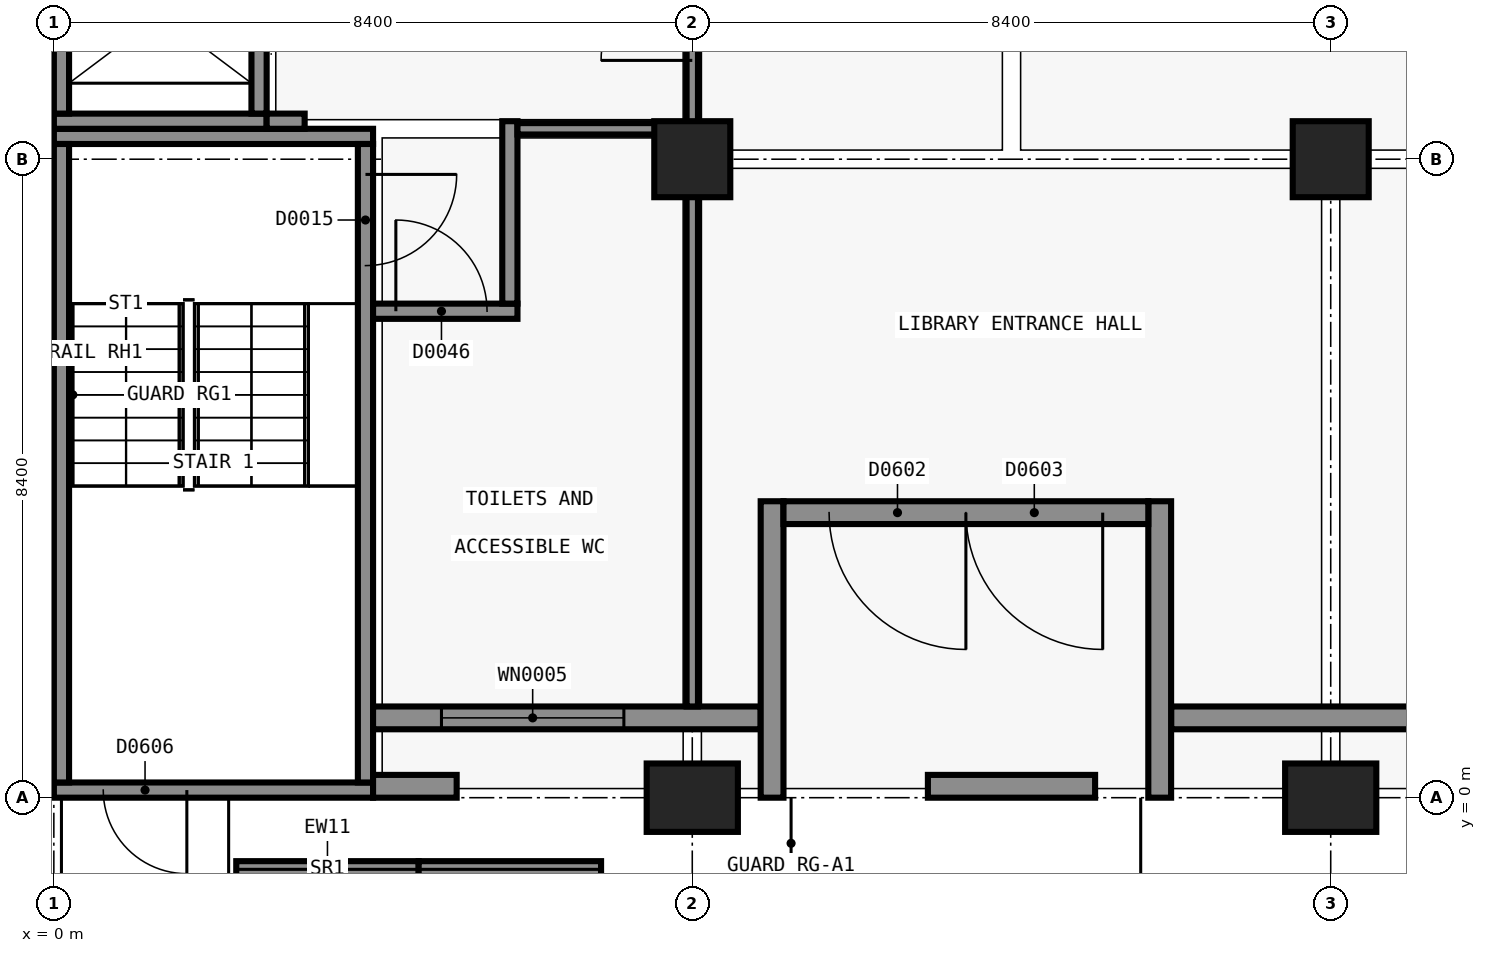
"""IFC4 building model, lengths in metres.
Left out: names, types, materials, properties, quantities, classifications, styles, units other than length and angle.
Written with IfcOpenShell. Run it as: python <this file> out.ifc"""

import sys

from ifc_helpers import new_model, si_unit, direction, frame, frame_2d, origin, origin_2d, place, context, subcontext, project, spatial, rectangle, extrude, element, fill, save


model = new_model("IFC4")
c1 = context("Model", 3, precision=1e-05, world=origin(), true_north=direction((0.0, 1.0)))
c2 = subcontext(c1, "Body", "Model", "MODEL_VIEW")
j1 = project(units=[si_unit("LENGTHUNIT", "METRE"), si_unit("PLANEANGLEUNIT", "RADIAN")], contexts=[c1])
p1 = place(None, origin())
s1 = spatial("IfcSite", under=j1, at=p1, CompositionType="ELEMENT")
p2 = place(p1, origin())
s2 = spatial("IfcBuilding", under=s1, at=p2, CompositionType="ELEMENT")
p3 = place(p2, origin())
s3 = spatial("IfcBuildingStorey", under=s2, at=p3, CompositionType="ELEMENT", Elevation=0.0)
p4 = place(p3, frame((4.2, 0.1, -0.3), z_axis=(0.0, 0.0, 1.0), x_axis=(-1.0, 0.0, 0.0)))
e1 = element("IfcWall", 1, at=p4, inside=s3, PredefinedType="SHEAR", context=c2, shape_type="SweptSolid", body=[
    extrude(rectangle(XDim=4.199, YDim=0.2, at=frame_2d((2.1, 0.0))), origin(), (0.0, 0.0, 1.0), 5.7),
])
p5 = place(p4, frame((2.45, 0.0, 0.0)))
e2 = element("IfcOpeningElement", 2, at=p5, cuts=e1, PredefinedType="OPENING", context=c2, shape_type="SweptSolid", body=[
    extrude(rectangle(XDim=1.1, YDim=2.2, at=frame_2d((0.55, 1.1))), frame((0.0, 0.11, 0.0), z_axis=(0.0, -1.0, 0.0), x_axis=(1.0, 0.0, 0.0)), (0.0, 0.0, 1.0), 0.22),
])
p6 = place(p3, frame((0.0, 8.7, -0.3), z_axis=(0.0, 0.0, 1.0), x_axis=(1.0, 0.0, 0.0)))
e3 = element("IfcWall", 3, at=p6, inside=s3, PredefinedType="SHEAR", context=c2, shape_type="SweptSolid", body=[
    extrude(rectangle(XDim=4.199, YDim=0.2, at=frame_2d((2.1, 0.0))), origin(), (0.0, 0.0, 1.0), 5.7),
])
p7 = place(p3, frame((0.1, 0.2, -0.3), z_axis=(0.0, 0.0, 1.0), x_axis=(0.0, 1.0, 0.0)))
e4 = element("IfcWall", 4, at=p7, inside=s3, PredefinedType="SHEAR", context=c2, shape_type="SweptSolid", body=[
    extrude(rectangle(XDim=8.4, YDim=0.2, at=frame_2d((4.2, 0.0))), origin(), (0.0, 0.0, 1.0), 5.7),
])
p8 = place(p3, frame((4.1, 8.6, -0.3), z_axis=(0.0, 0.0, 1.0), x_axis=(0.0, -1.0, 0.0)))
e5 = element("IfcWall", 5, at=p8, inside=s3, PredefinedType="SHEAR", context=c2, shape_type="SweptSolid", body=[
    extrude(rectangle(XDim=8.4, YDim=0.2, at=frame_2d((4.2, 0.0))), origin(), (0.0, 0.0, 1.0), 5.7),
])
p9 = place(p8, frame((0.4, 0.0, 0.3)))
e6 = element("IfcOpeningElement", 6, at=p9, cuts=e5, PredefinedType="OPENING", context=c2, shape_type="SweptSolid", body=[
    extrude(rectangle(XDim=1.2, YDim=2.1, at=frame_2d((0.6, 1.05))), frame((0.0, 0.11, 0.0), z_axis=(0.0, -1.0, 0.0), x_axis=(1.0, 0.0, 0.0)), (0.0, 0.0, 1.0), 0.22),
])
p10 = place(p3, frame((2.8, 8.9, -1.6), z_axis=(0.0, 0.0, 1.0), x_axis=(-1.0, 0.0, 0.0)))
e7 = element("IfcWall", 7, at=p10, inside=s3, PredefinedType="SHEAR", context=c2, shape_type="SweptSolid", body=[
    extrude(rectangle(XDim=2.8, YDim=0.2, at=frame_2d((1.4, 0.0))), origin(), (0.0, 0.0, 1.0), 7.0),
])
p11 = place(p3, frame((0.1, 9.0, -1.6), z_axis=(0.0, 0.0, 1.0), x_axis=(0.0, 1.0, 0.0)))
e8 = element("IfcWall", 8, at=p11, inside=s3, PredefinedType="SHEAR", context=c2, shape_type="SweptSolid", body=[
    extrude(rectangle(XDim=2.7, YDim=0.2, at=frame_2d((1.35, 0.0))), origin(), (0.0, 0.0, 1.0), 7.0),
])
p12 = place(p3, frame((2.7, 11.7, -1.6), z_axis=(0.0, 0.0, 1.0), x_axis=(0.0, -1.0, 0.0)))
e9 = element("IfcWall", 9, at=p12, inside=s3, PredefinedType="SHEAR", context=c2, shape_type="SweptSolid", body=[
    extrude(rectangle(XDim=2.7, YDim=0.2, at=frame_2d((1.35, 0.0))), origin(), (0.0, 0.0, 1.0), 7.0),
])
p13 = place(p12, frame((0.85, 0.0, 1.6)))
e10 = element("IfcOpeningElement", 10, at=p13, cuts=e9, PredefinedType="OPENING", context=c2, shape_type="SweptSolid", body=[
    extrude(rectangle(XDim=1.1, YDim=2.1, at=frame_2d((0.55, 1.05))), frame((0.0, 0.11, 0.0), z_axis=(0.0, -1.0, 0.0), x_axis=(1.0, 0.0, 0.0)), (0.0, 0.0, 1.0), 0.22),
])
p14 = place(p3, frame((8.4, 0.0, -0.3), z_axis=(0.0, 0.0, 1.0), x_axis=(1.0, 0.0, 0.0)))
e11 = element("IfcColumn", 11, at=p14, inside=s3, PredefinedType="COLUMN", context=c2, shape_type="SweptSolid", body=[
    extrude(rectangle(XDim=1.2, YDim=0.9, at=origin_2d()), origin(), (0.0, 0.0, 1.0), 5.7),
])
p15 = place(p3, frame((8.4, 8.4, -0.3), z_axis=(0.0, 0.0, 1.0), x_axis=(1.0, 0.0, 0.0)))
e12 = element("IfcColumn", 12, at=p15, inside=s3, PredefinedType="COLUMN", context=c2, shape_type="SweptSolid", body=[
    extrude(rectangle(XDim=1.0, YDim=1.0, at=origin_2d()), origin(), (0.0, 0.0, 1.0), 5.7),
])
p16 = place(p3, frame((16.8, 0.0, -0.3), z_axis=(0.0, 0.0, 1.0), x_axis=(1.0, 0.0, 0.0)))
e13 = element("IfcColumn", 13, at=p16, inside=s3, PredefinedType="COLUMN", context=c2, shape_type="SweptSolid", body=[
    extrude(rectangle(XDim=1.2, YDim=0.9, at=origin_2d()), origin(), (0.0, 0.0, 1.0), 5.7),
])
p17 = place(p3, frame((16.8, 8.4, -0.3), z_axis=(0.0, 0.0, 1.0), x_axis=(1.0, 0.0, 0.0)))
e14 = element("IfcColumn", 14, at=p17, inside=s3, PredefinedType="COLUMN", context=c2, shape_type="SweptSolid", body=[
    extrude(rectangle(XDim=1.0, YDim=1.0, at=origin_2d()), origin(), (0.0, 0.0, 1.0), 5.7),
])
p18 = place(p3, frame((3.3, 8.9, -0.3), z_axis=(0.0, 0.0, 1.0), x_axis=(-1.0, 0.0, 0.0)))
e15 = element("IfcWall", 15, at=p18, inside=s3, PredefinedType="SHEAR", context=c2, shape_type="SweptSolid", body=[
    extrude(rectangle(XDim=0.5, YDim=0.2, at=frame_2d((0.25, 0.0))), origin(), (0.0, 0.0, 1.0), 5.7),
])
p19 = place(p3, frame((5.3, 0.15, -1.2), z_axis=(0.0, 0.0, 1.0), x_axis=(-1.0, 0.0, 0.0)))
e16 = element("IfcWall", 16, at=p19, inside=s3, PredefinedType="SOLIDWALL", context=c2, shape_type="SweptSolid", body=[
    extrude(rectangle(XDim=1.1, YDim=0.3, at=frame_2d((0.55, 0.0))), origin(), (0.0, 0.0, 1.0), 0.9),
])
p20 = place(p3, frame((13.7, 0.15, -1.2), z_axis=(0.0, 0.0, 1.0), x_axis=(-1.0, 0.0, 0.0)))
e17 = element("IfcWall", 17, at=p20, inside=s3, PredefinedType="SOLIDWALL", context=c2, shape_type="SweptSolid", body=[
    extrude(rectangle(XDim=2.2, YDim=0.3, at=frame_2d((1.1, 0.0))), origin(), (0.0, 0.0, 1.0), 0.9),
])
p21 = place(p3, frame((2.4, -0.942, -1.2), z_axis=(0.0, 0.0, 1.0), x_axis=(1.0, 0.0, 0.0)))
e18 = element("IfcWall", 18, at=p21, inside=s3, PredefinedType="SOLIDWALL", context=c2, shape_type="SweptSolid", body=[
    extrude(rectangle(XDim=2.4, YDim=0.215, at=frame_2d((1.2, 0.0))), origin(), (0.0, 0.0, 1.0), 1.2),
])
p22 = place(p3, frame((4.8, -0.942, -1.2), z_axis=(0.0, 0.0, 1.0), x_axis=(1.0, 0.0, 0.0)))
e19 = element("IfcWall", 19, at=p22, inside=s3, PredefinedType="SOLIDWALL", context=c2, shape_type="SweptSolid", body=[
    extrude(rectangle(XDim=2.4, YDim=0.215, at=frame_2d((1.2, 0.0))), origin(), (0.0, 0.0, 1.0), 1.2),
])
p23 = place(p3, frame((9.3, 1.05, 0.0), z_axis=(0.0, 0.0, 1.0), x_axis=(-1.0, 0.0, 0.0)))
e20 = element("IfcWall", 20, at=p23, inside=s3, PredefinedType="SOLIDWALL", context=c2, shape_type="SweptSolid", body=[
    extrude(rectangle(XDim=5.1, YDim=0.3, at=frame_2d((2.55, 0.0))), origin(), (0.0, 0.0, 1.0), 5.1),
])
p24 = place(p23, frame((1.8, 0.0, 0.45)))
e21 = element("IfcOpeningElement", 21, at=p24, cuts=e20, PredefinedType="OPENING", context=c2, shape_type="SweptSolid", body=[
    extrude(rectangle(XDim=2.4, YDim=3.0, at=frame_2d((1.2, 1.5))), frame((0.0, 0.16, 0.0), z_axis=(0.0, -1.0, 0.0), x_axis=(1.0, 0.0, 0.0)), (0.0, 0.0, 1.0), 0.32),
])
p25 = place(p3, frame((18.9, 1.05, 0.0), z_axis=(0.0, 0.0, 1.0), x_axis=(-1.0, 0.0, 0.0)))
e22 = element("IfcWall", 22, at=p25, inside=s3, PredefinedType="SOLIDWALL", context=c2, shape_type="SweptSolid", body=[
    extrude(rectangle(XDim=4.2, YDim=0.3, at=frame_2d((2.1, 0.0))), origin(), (0.0, 0.0, 1.0), 5.1),
])
for number, where, z_axis, x_axis in (
    (23, (9.45, 3.9, 0.0), (0.0, 0.0, 1.0), (0.0, -1.0, 0.0)),
    (24, (14.55, 3.9, 0.0), (0.0, 0.0, 1.0), (0.0, -1.0, 0.0)),
):
    element("IfcWall", number, at=place(p3, frame(where, z_axis=z_axis, x_axis=x_axis)), inside=s3, PredefinedType="SOLIDWALL", context=c2, shape_type="SweptSolid", body=[
        extrude(rectangle(XDim=3.9, YDim=0.3, at=frame_2d((1.95, 0.0))), origin(), (0.0, 0.0, 1.0), 5.1),
    ])
p26 = place(p3, frame((14.4, 3.75, 0.0), z_axis=(0.0, 0.0, 1.0), x_axis=(-1.0, 0.0, 0.0)))
e25 = element("IfcWall", 25, at=p26, inside=s3, PredefinedType="SOLIDWALL", context=c2, shape_type="SweptSolid", body=[
    extrude(rectangle(XDim=4.8, YDim=0.3, at=frame_2d((2.4, 0.0))), origin(), (0.0, 0.0, 1.0), 5.1),
])
p27 = place(p26, frame((2.4, 0.0, 0.0)))
e26 = element("IfcOpeningElement", 26, at=p27, cuts=e25, PredefinedType="OPENING", context=c2, shape_type="SweptSolid", body=[
    extrude(rectangle(XDim=1.8, YDim=2.4, at=frame_2d((0.9, 1.2))), frame((0.0, 0.16, 0.0), z_axis=(0.0, -1.0, 0.0), x_axis=(1.0, 0.0, 0.0)), (0.0, 0.0, 1.0), 0.32),
])
p28 = place(p26, frame((0.6, 0.0, 0.0)))
e27 = element("IfcOpeningElement", 27, at=p28, cuts=e25, PredefinedType="OPENING", context=c2, shape_type="SweptSolid", body=[
    extrude(rectangle(XDim=1.8, YDim=2.4, at=frame_2d((0.9, 1.2))), frame((0.0, 0.16, 0.0), z_axis=(0.0, -1.0, 0.0), x_axis=(1.0, 0.0, 0.0)), (0.0, 0.0, 1.0), 0.32),
])
p29 = place(p3, frame((4.2, 6.4, 0.0), z_axis=(0.0, 0.0, 1.0), x_axis=(1.0, 0.0, 0.0)))
e28 = element("IfcWall", 28, at=p29, inside=s3, PredefinedType="SOLIDWALL", context=c2, shape_type="SweptSolid", body=[
    extrude(rectangle(XDim=1.9, YDim=0.2, at=frame_2d((0.95, 0.0))), origin(), (0.0, 0.0, 1.0), 5.1),
])
p30 = place(p29, frame((0.3, 0.0, 0.0)))
e29 = element("IfcOpeningElement", 29, at=p30, cuts=e28, PredefinedType="OPENING", context=c2, shape_type="SweptSolid", body=[
    extrude(rectangle(XDim=1.2, YDim=2.1, at=frame_2d((0.6, 1.05))), frame((0.0, 0.11, 0.0), z_axis=(0.0, -1.0, 0.0), x_axis=(1.0, 0.0, 0.0)), (0.0, 0.0, 1.0), 0.22),
])
p31 = place(p3, frame((6.0, 6.5, 0.0), z_axis=(0.0, 0.0, 1.0), x_axis=(0.0, 1.0, 0.0)))
e30 = element("IfcWall", 30, at=p31, inside=s3, PredefinedType="SOLIDWALL", context=c2, shape_type="SweptSolid", body=[
    extrude(rectangle(XDim=2.4, YDim=0.2, at=frame_2d((1.2, 0.0))), origin(), (0.0, 0.0, 1.0), 4.6),
])
p32 = place(p3, frame((6.1, 8.8, 0.0), z_axis=(0.0, 0.0, 1.0), x_axis=(1.0, 0.0, 0.0)))
e31 = element("IfcWall", 31, at=p32, inside=s3, PredefinedType="SOLIDWALL", context=c2, shape_type="SweptSolid", body=[
    extrude(rectangle(XDim=2.375, YDim=0.15, at=frame_2d((1.188, 0.0))), origin(), (0.0, 0.0, 1.0), 4.4),
])
p33 = place(p3, frame((8.4, 1.2, 0.0), z_axis=(0.0, 0.0, 1.0), x_axis=(0.0, 1.0, 0.0)))
e32 = element("IfcWall", 32, at=p33, inside=s3, PredefinedType="PARTITIONING", context=c2, shape_type="SweptSolid", body=[
    extrude(rectangle(XDim=7.525, YDim=0.15, at=frame_2d((3.763, 0.0))), origin(), (0.0, 0.0, 1.0), 4.4),
])
p34 = place(p3, frame((8.4, 8.875, 0.0), z_axis=(0.0, 0.0, 1.0), x_axis=(0.0, 1.0, 0.0)))
e33 = element("IfcWall", 33, at=p34, inside=s3, PredefinedType="SOLIDWALL", context=c2, shape_type="SweptSolid", body=[
    extrude(rectangle(XDim=2.85, YDim=0.15, at=frame_2d((1.425, 0.0))), origin(), (0.0, 0.0, 1.0), 4.4),
])
p35 = place(p34, frame((0.825, 0.0, 0.0)))
e34 = element("IfcOpeningElement", 34, at=p35, cuts=e33, PredefinedType="OPENING", context=c2, shape_type="SweptSolid", body=[
    extrude(rectangle(XDim=1.2, YDim=2.1, at=frame_2d((0.6, 1.05))), frame((0.0, 0.085, 0.0), z_axis=(0.0, -1.0, 0.0), x_axis=(1.0, 0.0, 0.0)), (0.0, 0.0, 1.0), 0.17),
])
p36 = place(p24, origin())
e35 = element("IfcWindow", 35, at=p36, inside=s3, PartitioningType="SINGLE_PANEL", PredefinedType="WINDOW", context=c2, shape_type="SweptSolid", body=[
    extrude(rectangle(XDim=2.4, YDim=3.0, at=frame_2d((1.2, 1.5))), frame((0.0, 0.03, 0.0), z_axis=(0.0, -1.0, 0.0), x_axis=(1.0, 0.0, 0.0)), (0.0, 0.0, 1.0), 0.06),
])
fill(e21, e35)
p37 = place(p27, origin())
e36 = element("IfcDoor", 36, at=p37, inside=s3, OperationType="SINGLE_SWING_LEFT", PredefinedType="DOOR", context=c2, shape_type="SweptSolid", body=[
    extrude(rectangle(XDim=1.8, YDim=2.4, at=frame_2d((0.9, 1.2))), frame((0.0, 0.025, 0.0), z_axis=(0.0, -1.0, 0.0), x_axis=(1.0, 0.0, 0.0)), (0.0, 0.0, 1.0), 0.05),
])
fill(e26, e36)
p38 = place(p28, origin())
e37 = element("IfcDoor", 37, at=p38, inside=s3, OperationType="SINGLE_SWING_LEFT", PredefinedType="DOOR", context=c2, shape_type="SweptSolid", body=[
    extrude(rectangle(XDim=1.8, YDim=2.4, at=frame_2d((0.9, 1.2))), frame((0.0, 0.025, 0.0), z_axis=(0.0, -1.0, 0.0), x_axis=(1.0, 0.0, 0.0)), (0.0, 0.0, 1.0), 0.05),
])
fill(e27, e37)
p39 = place(p5, origin())
e38 = element("IfcDoor", 38, at=p39, inside=s3, OperationType="SINGLE_SWING_LEFT", PredefinedType="DOOR", context=c2, shape_type="SweptSolid", body=[
    extrude(rectangle(XDim=1.1, YDim=2.2, at=frame_2d((0.55, 1.1))), frame((0.0, 0.025, 0.0), z_axis=(0.0, -1.0, 0.0), x_axis=(1.0, 0.0, 0.0)), (0.0, 0.0, 1.0), 0.05),
])
fill(e2, e38)
p40 = place(p13, origin())
e39 = element("IfcDoor", 39, at=p40, inside=s3, OperationType="SLIDING_TO_LEFT", PredefinedType="DOOR", context=c2, shape_type="SweptSolid", body=[
    extrude(rectangle(XDim=1.1, YDim=2.1, at=frame_2d((0.55, 1.05))), frame((0.0, 0.025, 0.0), z_axis=(0.0, -1.0, 0.0), x_axis=(1.0, 0.0, 0.0)), (0.0, 0.0, 1.0), 0.05),
])
fill(e10, e39)
p41 = place(p9, origin())
e40 = element("IfcDoor", 40, at=p41, inside=s3, OperationType="SINGLE_SWING_RIGHT", PredefinedType="DOOR", context=c2, shape_type="SweptSolid", body=[
    extrude(rectangle(XDim=1.2, YDim=2.1, at=frame_2d((0.6, 1.05))), frame((0.0, 0.025, 0.0), z_axis=(0.0, -1.0, 0.0), x_axis=(1.0, 0.0, 0.0)), (0.0, 0.0, 1.0), 0.05),
])
fill(e6, e40)
p42 = place(p30, origin())
e41 = element("IfcDoor", 41, at=p42, inside=s3, OperationType="SINGLE_SWING_LEFT", PredefinedType="DOOR", context=c2, shape_type="SweptSolid", body=[
    extrude(rectangle(XDim=1.2, YDim=2.1, at=frame_2d((0.6, 1.05))), frame((0.0, 0.025, 0.0), z_axis=(0.0, -1.0, 0.0), x_axis=(1.0, 0.0, 0.0)), (0.0, 0.0, 1.0), 0.05),
])
fill(e29, e41)
p43 = place(p35, origin())
e42 = element("IfcDoor", 42, at=p43, inside=s3, OperationType="SINGLE_SWING_RIGHT", PredefinedType="DOOR", context=c2, shape_type="SweptSolid", body=[
    extrude(rectangle(XDim=1.2, YDim=2.1, at=frame_2d((0.6, 1.05))), frame((0.0, 0.025, 0.0), z_axis=(0.0, -1.0, 0.0), x_axis=(1.0, 0.0, 0.0)), (0.0, 0.0, 1.0), 0.05),
])
fill(e34, e42)
save(model, sys.argv[1])
